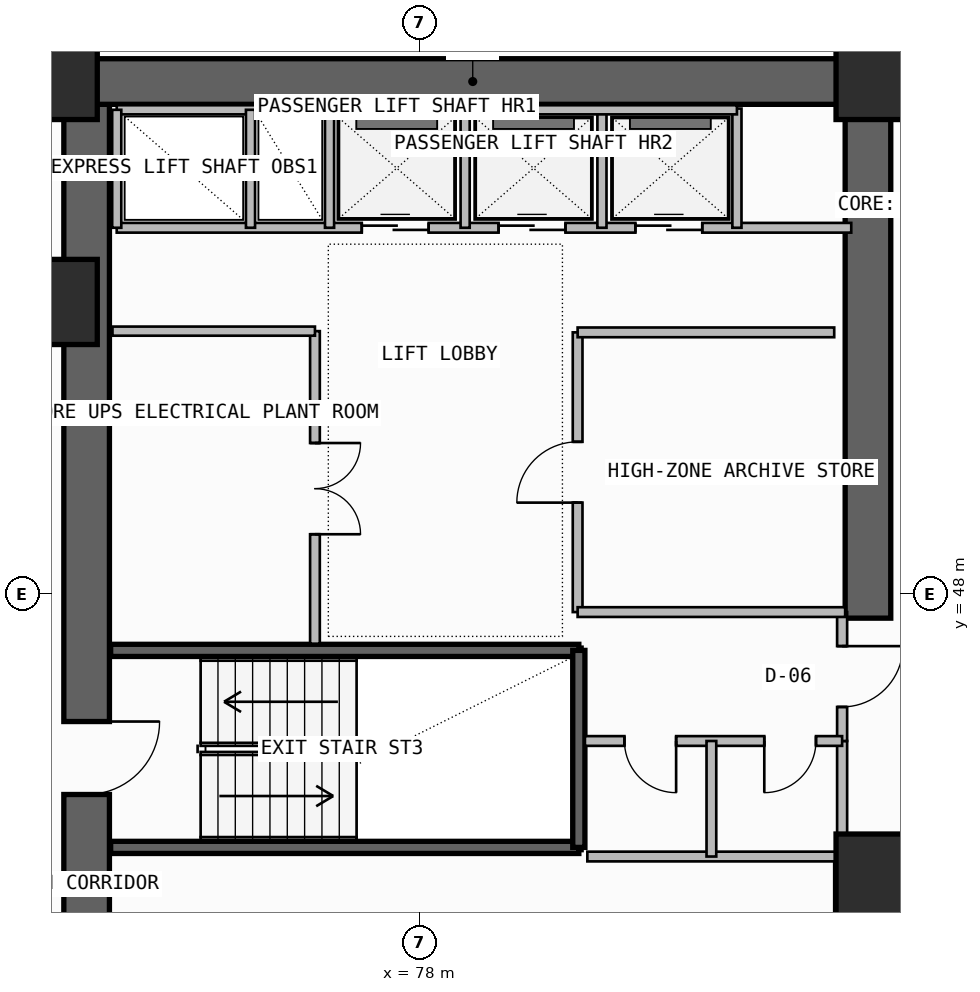
"""IFC4 building model, lengths in metres.
Left out: names, types, materials, properties, quantities, classifications, styles, units other than length and angle.
Written with IfcOpenShell. Run it as: python <this file> out.ifc"""

import sys

from ifc_helpers import new_model, si_unit, direction, frame, frame_2d, origin, origin_2d, place, context, subcontext, project, spatial, rectangle, extrude, element, fill, save


model = new_model("IFC4")
c1 = context("Model", 3, precision=1e-05, world=origin(), true_north=direction((0.0, 1.0)))
c2 = subcontext(c1, "Body", "Model", "MODEL_VIEW")
j1 = project(units=[si_unit("LENGTHUNIT", "METRE"), si_unit("PLANEANGLEUNIT", "RADIAN")], contexts=[c1])
p1 = place(None, origin())
s1 = spatial("IfcSite", under=j1, at=p1, CompositionType="ELEMENT")
p2 = place(p1, origin())
s2 = spatial("IfcBuilding", under=s1, at=p2, CompositionType="ELEMENT")
p3 = place(p2, frame((0.0, 0.0, 229.06)))
s3 = spatial("IfcBuildingStorey", under=s2, at=p3, CompositionType="ELEMENT", Elevation=229.06)
p4 = place(p3, frame((72.525, 35.5, -0.26), z_axis=(0.0, 0.0, 1.0), x_axis=(0.0, 1.0, 0.0)))
e1 = element("IfcWall", 1, at=p4, inside=s3, PredefinedType="SHEAR", context=c2, shape_type="SweptSolid", body=[
    extrude(rectangle(XDim=7.85, YDim=0.75, at=frame_2d((3.925, 0.0))), origin(), (0.0, 0.0, 1.0), 3.52),
])
p5 = place(p4, frame((1.45, 0.0, 0.26)))
e2 = element("IfcOpeningElement", 2, at=p5, cuts=e1, PredefinedType="OPENING", context=c2, shape_type="SweptSolid", body=[
    extrude(rectangle(XDim=1.2, YDim=2.2, at=frame_2d((0.6, 1.1))), frame((0.0, 0.385, 0.0), z_axis=(0.0, -1.0, 0.0), x_axis=(1.0, 0.0, 0.0)), (0.0, 0.0, 1.0), 0.77),
])
p6 = place(p3, frame((72.525, 43.35, -0.26), z_axis=(0.0, 0.0, 1.0), x_axis=(0.0, 1.0, 0.0)))
e3 = element("IfcWall", 3, at=p6, inside=s3, PredefinedType="SHEAR", context=c2, shape_type="SweptSolid", body=[
    extrude(rectangle(XDim=12.7, YDim=0.75, at=frame_2d((6.35, 0.0))), origin(), (0.0, 0.0, 1.0), 3.52),
])
p7 = place(p6, frame((1.35, 0.0, 0.26)))
e4 = element("IfcOpeningElement", 4, at=p7, cuts=e3, PredefinedType="OPENING", context=c2, shape_type="SweptSolid", body=[
    extrude(rectangle(XDim=1.2, YDim=2.2, at=frame_2d((0.6, 1.1))), frame((0.0, 0.385, 0.0), z_axis=(0.0, -1.0, 0.0), x_axis=(1.0, 0.0, 0.0)), (0.0, 0.0, 1.0), 0.77),
])
p8 = place(p3, frame((72.0, 56.425, -0.26), z_axis=(0.0, 0.0, 1.0), x_axis=(1.0, 0.0, 0.0)))
e5 = element("IfcWall", 5, at=p8, inside=s3, PredefinedType="SHEAR", context=c2, shape_type="SweptSolid", body=[
    extrude(rectangle(XDim=13.75, YDim=0.75, at=frame_2d((6.875, 0.0))), origin(), (0.0, 0.0, 1.0), 3.52),
])
p9 = place(p3, frame((85.375, 47.6, -0.26), z_axis=(0.0, 0.0, 1.0), x_axis=(0.0, 1.0, 0.0)))
e6 = element("IfcWall", 6, at=p9, inside=s3, PredefinedType="SHEAR", context=c2, shape_type="SweptSolid", body=[
    extrude(rectangle(XDim=8.45, YDim=0.75, at=frame_2d((4.225, 0.0))), origin(), (0.0, 0.0, 1.0), 3.52),
])
for number, where, z_axis, x_axis in (
    (7, (85.55, 43.35, 0.0), (0.0, 0.0, 1.0), (1.0, 0.0, 0.0)),
    (8, (72.0, 52.8, 0.0), (0.0, 0.0, 1.0), (1.0, 0.0, 0.0)),
    (9, (72.0, 56.5, 0.0), (0.0, 0.0, 1.0), (1.0, 0.0, 0.0)),
    (10, (85.55, 56.5, 0.0), (0.0, 0.0, 1.0), (1.0, 0.0, 0.0)),
):
    element("IfcColumn", number, at=place(p3, frame(where, z_axis=z_axis, x_axis=x_axis)), inside=s3, PredefinedType="COLUMN", context=c2, shape_type="SweptSolid", body=[
        extrude(rectangle(XDim=1.4, YDim=1.4, at=origin_2d()), origin(), (0.0, 0.0, 1.0), 3.52),
    ])
p10 = place(p3, frame((116.396, 56.722, 0.0), z_axis=(0.0, 0.0, 1.0), x_axis=(-0.977936620644, 0.208901809478, 0.0)))
e11 = element("IfcWall", 11, at=p10, inside=s3, PredefinedType="PARAPET", context=c2, shape_type="SweptSolid", body=[
    extrude(rectangle(XDim=31.685, YDim=0.2, at=frame_2d((15.843, 0.0))), origin(), (0.0, 0.0, 1.0), 1.15),
])
p11 = place(p3, frame((84.92, 38.85, 0.0), z_axis=(0.0, 0.0, 1.0), x_axis=(0.0, 1.0, 0.0)))
e12 = element("IfcWall", 12, at=p11, inside=s3, PredefinedType="SOLIDWALL", context=c2, shape_type="SweptSolid", body=[
    extrude(rectangle(XDim=4.83, YDim=0.2, at=frame_2d((2.415, 0.0))), origin(), (0.0, 0.0, 1.0), 3.26),
])
p12 = place(p11, frame((1.25, 0.0, 0.0)))
e13 = element("IfcOpeningElement", 13, at=p12, cuts=e12, PredefinedType="OPENING", context=c2, shape_type="SweptSolid", body=[
    extrude(rectangle(XDim=1.1, YDim=2.2, at=frame_2d((0.55, 1.1))), frame((0.0, 0.11, 0.0), z_axis=(0.0, -1.0, 0.0), x_axis=(1.0, 0.0, 0.0)), (0.0, 0.0, 1.0), 0.22),
])
for number, where, z_axis, x_axis in (
    (14, (72.92, 43.83, -0.26), (0.0, 0.0, 1.0), (1.0, 0.0, 0.0)),
    (15, (72.92, 47.07, -0.26), (0.0, 0.0, 1.0), (1.0, 0.0, 0.0)),
):
    element("IfcWall", number, at=place(p3, frame(where, z_axis=z_axis, x_axis=x_axis)), inside=s3, PredefinedType="SOLIDWALL", context=c2, shape_type="SweptSolid", body=[
        extrude(rectangle(XDim=7.7, YDim=0.2, at=frame_2d((3.85, 0.0))), origin(), (0.0, 0.0, 1.0), 3.52),
    ])
p13 = place(p3, frame((80.62, 43.83, -0.26), z_axis=(0.0, 0.0, 1.0), x_axis=(0.0, 1.0, 0.0)))
e16 = element("IfcWall", 16, at=p13, inside=s3, PredefinedType="SOLIDWALL", context=c2, shape_type="SweptSolid", body=[
    extrude(rectangle(XDim=3.24, YDim=0.2, at=frame_2d((1.62, 0.0))), origin(), (0.0, 0.0, 1.0), 3.52),
])
p14 = place(p3, frame((84.95, 43.68, 0.0), z_axis=(0.0, 0.0, 1.0), x_axis=(0.0, 1.0, 0.0)))
e17 = element("IfcWall", 17, at=p14, inside=s3, PredefinedType="PLUMBINGWALL", context=c2, shape_type="SweptSolid", body=[
    extrude(rectangle(XDim=1.9, YDim=0.165, at=frame_2d((0.95, 0.0))), origin(), (0.0, 0.0, 1.0), 3.26),
])
p15 = place(p3, frame((84.95, 45.58, 0.0), z_axis=(0.0, 0.0, 1.0), x_axis=(0.0, 1.0, 0.0)))
e18 = element("IfcWall", 18, at=p15, inside=s3, PredefinedType="PARTITIONING", context=c2, shape_type="SweptSolid", body=[
    extrude(rectangle(XDim=2.12, YDim=0.165, at=frame_2d((1.06, 0.0))), origin(), (0.0, 0.0, 1.0), 3.26),
])
p16 = place(p15, frame((0.56, 0.0, 0.0)))
e19 = element("IfcOpeningElement", 19, at=p16, cuts=e18, PredefinedType="OPENING", context=c2, shape_type="SweptSolid", body=[
    extrude(rectangle(XDim=1.0, YDim=2.2, at=frame_2d((0.5, 1.1))), frame((0.0, 0.093, 0.0), z_axis=(0.0, -1.0, 0.0), x_axis=(1.0, 0.0, 0.0)), (0.0, 0.0, 1.0), 0.185),
])
p17 = place(p3, frame((80.72, 45.58, 0.0), z_axis=(0.0, 0.0, 1.0), x_axis=(1.0, 0.0, 0.0)))
e20 = element("IfcWall", 20, at=p17, inside=s3, PredefinedType="PLUMBINGWALL", context=c2, shape_type="SweptSolid", body=[
    extrude(rectangle(XDim=4.23, YDim=0.16, at=frame_2d((2.115, 0.0))), origin(), (0.0, 0.0, 1.0), 3.26),
])
p18 = place(p17, frame((0.65, 0.0, 0.0)))
e21 = element("IfcOpeningElement", 21, at=p18, cuts=e20, PredefinedType="OPENING", context=c2, shape_type="SweptSolid", body=[
    extrude(rectangle(XDim=0.85, YDim=2.05, at=frame_2d((0.425, 1.025))), frame((0.0, 0.09, 0.0), z_axis=(0.0, -1.0, 0.0), x_axis=(1.0, 0.0, 0.0)), (0.0, 0.0, 1.0), 0.18),
])
p19 = place(p17, frame((2.95, 0.0, 0.0)))
e22 = element("IfcOpeningElement", 22, at=p19, cuts=e20, PredefinedType="OPENING", context=c2, shape_type="SweptSolid", body=[
    extrude(rectangle(XDim=0.85, YDim=2.05, at=frame_2d((0.425, 1.025))), frame((0.0, 0.09, 0.0), z_axis=(0.0, -1.0, 0.0), x_axis=(1.0, 0.0, 0.0)), (0.0, 0.0, 1.0), 0.18),
])
p20 = place(p3, frame((80.76, 43.68, 0.0), z_axis=(0.0, 0.0, 1.0), x_axis=(1.0, 0.0, 0.0)))
e23 = element("IfcWall", 23, at=p20, inside=s3, PredefinedType="PLUMBINGWALL", context=c2, shape_type="SweptSolid", body=[
    extrude(rectangle(XDim=4.19, YDim=0.16, at=frame_2d((2.095, 0.0))), origin(), (0.0, 0.0, 1.0), 3.26),
])
p21 = place(p3, frame((82.8, 43.68, 0.0), z_axis=(0.0, 0.0, 1.0), x_axis=(0.0, 1.0, 0.0)))
e24 = element("IfcWall", 24, at=p21, inside=s3, PredefinedType="PLUMBINGWALL", context=c2, shape_type="SweptSolid", body=[
    extrude(rectangle(XDim=1.9, YDim=0.16, at=frame_2d((0.95, 0.0))), origin(), (0.0, 0.0, 1.0), 3.26),
])
p22 = place(p3, frame((76.28, 47.18, 0.0), z_axis=(0.0, 0.0, 1.0), x_axis=(0.0, 1.0, 0.0)))
e25 = element("IfcWall", 25, at=p22, inside=s3, PredefinedType="SOLIDWALL", context=c2, shape_type="SweptSolid", body=[
    extrude(rectangle(XDim=5.14, YDim=0.16, at=frame_2d((2.57, 0.0))), origin(), (0.0, 0.0, 1.0), 3.26),
])
p23 = place(p22, frame((1.8, 0.0, 0.0)))
e26 = element("IfcOpeningElement", 26, at=p23, cuts=e25, PredefinedType="OPENING", context=c2, shape_type="SweptSolid", body=[
    extrude(rectangle(XDim=1.5, YDim=2.25, at=frame_2d((0.75, 1.125))), frame((0.0, 0.09, 0.0), z_axis=(0.0, -1.0, 0.0), x_axis=(1.0, 0.0, 0.0)), (0.0, 0.0, 1.0), 0.18),
])
p24 = place(p3, frame((72.95, 52.32, 0.0), z_axis=(0.0, 0.0, 1.0), x_axis=(1.0, 0.0, 0.0)))
e27 = element("IfcWall", 27, at=p24, inside=s3, PredefinedType="SOLIDWALL", context=c2, shape_type="SweptSolid", body=[
    extrude(rectangle(XDim=3.33, YDim=0.15, at=frame_2d((1.665, 0.0))), origin(), (0.0, 0.0, 1.0), 3.26),
])
p25 = place(p3, frame((80.6, 47.7, 0.0), z_axis=(0.0, 0.0, 1.0), x_axis=(0.0, 1.0, 0.0)))
e28 = element("IfcWall", 28, at=p25, inside=s3, PredefinedType="SOLIDWALL", context=c2, shape_type="SweptSolid", body=[
    extrude(rectangle(XDim=4.6, YDim=0.16, at=frame_2d((2.3, 0.0))), origin(), (0.0, 0.0, 1.0), 3.26),
])
p26 = place(p25, frame((1.8, 0.0, 0.0)))
e29 = element("IfcOpeningElement", 29, at=p26, cuts=e28, PredefinedType="OPENING", context=c2, shape_type="SweptSolid", body=[
    extrude(rectangle(XDim=1.0, YDim=2.2, at=frame_2d((0.5, 1.1))), frame((0.0, 0.09, 0.0), z_axis=(0.0, -1.0, 0.0), x_axis=(1.0, 0.0, 0.0)), (0.0, 0.0, 1.0), 0.18),
])
p27 = place(p3, frame((80.6, 47.7, 0.0), z_axis=(0.0, 0.0, 1.0), x_axis=(1.0, 0.0, 0.0)))
e30 = element("IfcWall", 30, at=p27, inside=s3, PredefinedType="SOLIDWALL", context=c2, shape_type="SweptSolid", body=[
    extrude(rectangle(XDim=4.4, YDim=0.16, at=frame_2d((2.2, 0.0))), origin(), (0.0, 0.0, 1.0), 3.26),
])
p28 = place(p3, frame((80.6, 52.3, 0.0), z_axis=(0.0, 0.0, 1.0), x_axis=(1.0, 0.0, 0.0)))
e31 = element("IfcWall", 31, at=p28, inside=s3, PredefinedType="SOLIDWALL", context=c2, shape_type="SweptSolid", body=[
    extrude(rectangle(XDim=4.22, YDim=0.16, at=frame_2d((2.11, 0.0))), origin(), (0.0, 0.0, 1.0), 3.26),
])
p29 = place(p3, frame((73.02, 54.02, 0.0), z_axis=(0.0, 0.0, 1.0), x_axis=(1.0, 0.0, 0.0)))
e32 = element("IfcWall", 32, at=p29, inside=s3, PredefinedType="SOLIDWALL", context=c2, shape_type="SweptSolid", body=[
    extrude(rectangle(XDim=12.08, YDim=0.16, at=frame_2d((6.04, 0.0))), origin(), (0.0, 0.0, 1.0), 3.26),
])
p30 = place(p29, frame((4.03, 0.0, 0.0)))
e33 = element("IfcOpeningElement", 33, at=p30, cuts=e32, PredefinedType="OPENING", context=c2, shape_type="SweptSolid", body=[
    extrude(rectangle(XDim=1.1, YDim=2.25, at=frame_2d((0.55, 1.125))), frame((0.0, 0.09, 0.0), z_axis=(0.0, -1.0, 0.0), x_axis=(1.0, 0.0, 0.0)), (0.0, 0.0, 1.0), 0.18),
])
p31 = place(p29, frame((6.28, 0.0, 0.0)))
e34 = element("IfcOpeningElement", 34, at=p31, cuts=e32, PredefinedType="OPENING", context=c2, shape_type="SweptSolid", body=[
    extrude(rectangle(XDim=1.1, YDim=2.25, at=frame_2d((0.55, 1.125))), frame((0.0, 0.09, 0.0), z_axis=(0.0, -1.0, 0.0), x_axis=(1.0, 0.0, 0.0)), (0.0, 0.0, 1.0), 0.18),
])
p32 = place(p29, frame((8.53, 0.0, 0.0)))
e35 = element("IfcOpeningElement", 35, at=p32, cuts=e32, PredefinedType="OPENING", context=c2, shape_type="SweptSolid", body=[
    extrude(rectangle(XDim=1.1, YDim=2.25, at=frame_2d((0.55, 1.125))), frame((0.0, 0.09, 0.0), z_axis=(0.0, -1.0, 0.0), x_axis=(1.0, 0.0, 0.0)), (0.0, 0.0, 1.0), 0.18),
])
p33 = place(p3, frame((73.02, 55.96, 0.0), z_axis=(0.0, 0.0, 1.0), x_axis=(1.0, 0.0, 0.0)))
e36 = element("IfcWall", 36, at=p33, inside=s3, PredefinedType="SOLIDWALL", context=c2, shape_type="SweptSolid", body=[
    extrude(rectangle(XDim=3.5, YDim=0.15, at=frame_2d((1.75, 0.0))), origin(), (0.0, 0.0, 1.0), 3.26),
])
p34 = place(p3, frame((73.02, 54.02, 0.0), z_axis=(0.0, 0.0, 1.0), x_axis=(0.0, 1.0, 0.0)))
e37 = element("IfcWall", 37, at=p34, inside=s3, PredefinedType="PLUMBINGWALL", context=c2, shape_type="SweptSolid", body=[
    extrude(rectangle(XDim=1.94, YDim=0.15, at=frame_2d((0.97, 0.0))), origin(), (0.0, 0.0, 1.0), 3.26),
])
p35 = place(p3, frame((76.52, 54.02, 0.0), z_axis=(0.0, 0.0, 1.0), x_axis=(0.0, 1.0, 0.0)))
e38 = element("IfcWall", 38, at=p35, inside=s3, PredefinedType="SOLIDWALL", context=c2, shape_type="SweptSolid", body=[
    extrude(rectangle(XDim=1.94, YDim=0.15, at=frame_2d((0.97, 0.0))), origin(), (0.0, 0.0, 1.0), 3.26),
])
p36 = place(p3, frame((75.22, 54.02, 0.0), z_axis=(0.0, 0.0, 1.0), x_axis=(0.0, 1.0, 0.0)))
e39 = element("IfcWall", 39, at=p36, inside=s3, PredefinedType="PLUMBINGWALL", context=c2, shape_type="SweptSolid", body=[
    extrude(rectangle(XDim=1.94, YDim=0.15, at=frame_2d((0.97, 0.0))), origin(), (0.0, 0.0, 1.0), 3.26),
])
for number, where, z_axis, x_axis in (
    (40, (78.75, 54.02, 0.0), (0.0, 0.0, 1.0), (0.0, 1.0, 0.0)),
    (41, (81.0, 54.02, 0.0), (0.0, 0.0, 1.0), (0.0, 1.0, 0.0)),
):
    element("IfcWall", number, at=place(p3, frame(where, z_axis=z_axis, x_axis=x_axis)), inside=s3, PredefinedType="PLUMBINGWALL", context=c2, shape_type="SweptSolid", body=[
        extrude(rectangle(XDim=1.96, YDim=0.15, at=frame_2d((0.98, 0.0))), origin(), (0.0, 0.0, 1.0), 3.26),
    ])
p37 = place(p3, frame((83.22, 54.02, 0.0), z_axis=(0.0, 0.0, 1.0), x_axis=(0.0, 1.0, 0.0)))
e42 = element("IfcWall", 42, at=p37, inside=s3, PredefinedType="SOLIDWALL", context=c2, shape_type="SweptSolid", body=[
    extrude(rectangle(XDim=1.96, YDim=0.15, at=frame_2d((0.98, 0.0))), origin(), (0.0, 0.0, 1.0), 3.26),
])
p38 = place(p3, frame((76.52, 55.96, 0.0), z_axis=(0.0, 0.0, 1.0), x_axis=(1.0, 0.0, 0.0)))
e43 = element("IfcWall", 43, at=p38, inside=s3, PredefinedType="SOLIDWALL", context=c2, shape_type="SweptSolid", body=[
    extrude(rectangle(XDim=6.7, YDim=0.15, at=frame_2d((3.35, 0.0))), origin(), (0.0, 0.0, 1.0), 3.26),
])
p39 = place(p7, frame((1.2, 0.0, 0.0), z_axis=(0.0, 0.0, 1.0), x_axis=(-1.0, 0.0, 0.0)))
e44 = element("IfcDoor", 44, at=p39, inside=s3, OperationType="SINGLE_SWING_LEFT", PredefinedType="USERDEFINED", context=c2, shape_type="SweptSolid", body=[
    extrude(rectangle(XDim=1.2, YDim=2.2, at=frame_2d((0.6, 1.1))), frame((0.0, 0.025, 0.0), z_axis=(0.0, -1.0, 0.0), x_axis=(1.0, 0.0, 0.0)), (0.0, 0.0, 1.0), 0.05),
])
fill(e4, e44)
p40 = place(p16, frame((1.0, 0.0, 0.0), z_axis=(0.0, 0.0, 1.0), x_axis=(-1.0, 0.0, 0.0)))
e45 = element("IfcDoor", 45, at=p40, inside=s3, OperationType="SINGLE_SWING_LEFT", PredefinedType="DOOR", context=c2, shape_type="SweptSolid", body=[
    extrude(rectangle(XDim=1.0, YDim=2.2, at=frame_2d((0.5, 1.1))), frame((0.0, 0.025, 0.0), z_axis=(0.0, -1.0, 0.0), x_axis=(1.0, 0.0, 0.0)), (0.0, 0.0, 1.0), 0.05),
])
fill(e19, e45)
p41 = place(p18, frame((0.85, 0.0, 0.0), z_axis=(0.0, 0.0, 1.0), x_axis=(-1.0, 0.0, 0.0)))
e46 = element("IfcDoor", 46, at=p41, inside=s3, OperationType="SINGLE_SWING_LEFT", PredefinedType="DOOR", context=c2, shape_type="SweptSolid", body=[
    extrude(rectangle(XDim=0.85, YDim=2.05, at=frame_2d((0.425, 1.025))), frame((0.0, 0.025, 0.0), z_axis=(0.0, -1.0, 0.0), x_axis=(1.0, 0.0, 0.0)), (0.0, 0.0, 1.0), 0.05),
])
fill(e21, e46)
p42 = place(p19, frame((0.85, 0.0, 0.0), z_axis=(0.0, 0.0, 1.0), x_axis=(-1.0, 0.0, 0.0)))
e47 = element("IfcDoor", 47, at=p42, inside=s3, OperationType="SINGLE_SWING_RIGHT", PredefinedType="DOOR", context=c2, shape_type="SweptSolid", body=[
    extrude(rectangle(XDim=0.85, YDim=2.05, at=frame_2d((0.425, 1.025))), frame((0.0, 0.025, 0.0), z_axis=(0.0, -1.0, 0.0), x_axis=(1.0, 0.0, 0.0)), (0.0, 0.0, 1.0), 0.05),
])
fill(e22, e47)
p43 = place(p23, frame((1.5, 0.0, 0.0), z_axis=(0.0, 0.0, 1.0), x_axis=(-1.0, 0.0, 0.0)))
e48 = element("IfcDoor", 48, at=p43, inside=s3, OperationType="DOUBLE_DOOR_SINGLE_SWING", PredefinedType="DOOR", context=c2, shape_type="SweptSolid", body=[
    extrude(rectangle(XDim=1.5, YDim=2.25, at=frame_2d((0.75, 1.125))), frame((0.0, 0.025, 0.0), z_axis=(0.0, -1.0, 0.0), x_axis=(1.0, 0.0, 0.0)), (0.0, 0.0, 1.0), 0.05),
])
fill(e26, e48)
p44 = place(p26, origin())
e49 = element("IfcDoor", 49, at=p44, inside=s3, OperationType="SINGLE_SWING_LEFT", PredefinedType="DOOR", context=c2, shape_type="SweptSolid", body=[
    extrude(rectangle(XDim=1.0, YDim=2.2, at=frame_2d((0.5, 1.1))), frame((0.0, 0.025, 0.0), z_axis=(0.0, -1.0, 0.0), x_axis=(1.0, 0.0, 0.0)), (0.0, 0.0, 1.0), 0.05),
])
fill(e29, e49)
p45 = place(p30, origin())
e50 = element("IfcDoor", 50, at=p45, inside=s3, OperationType="DOUBLE_DOOR_SLIDING", PredefinedType="DOOR", context=c2, shape_type="SweptSolid", body=[
    extrude(rectangle(XDim=1.1, YDim=2.25, at=frame_2d((0.55, 1.125))), frame((0.0, 0.025, 0.0), z_axis=(0.0, -1.0, 0.0), x_axis=(1.0, 0.0, 0.0)), (0.0, 0.0, 1.0), 0.05),
])
fill(e33, e50)
p46 = place(p31, origin())
e51 = element("IfcDoor", 51, at=p46, inside=s3, OperationType="DOUBLE_DOOR_SLIDING", PredefinedType="DOOR", context=c2, shape_type="SweptSolid", body=[
    extrude(rectangle(XDim=1.1, YDim=2.25, at=frame_2d((0.55, 1.125))), frame((0.0, 0.025, 0.0), z_axis=(0.0, -1.0, 0.0), x_axis=(1.0, 0.0, 0.0)), (0.0, 0.0, 1.0), 0.05),
])
fill(e34, e51)
p47 = place(p32, origin())
e52 = element("IfcDoor", 52, at=p47, inside=s3, OperationType="DOUBLE_DOOR_SLIDING", PredefinedType="DOOR", context=c2, shape_type="SweptSolid", body=[
    extrude(rectangle(XDim=1.1, YDim=2.25, at=frame_2d((0.55, 1.125))), frame((0.0, 0.025, 0.0), z_axis=(0.0, -1.0, 0.0), x_axis=(1.0, 0.0, 0.0)), (0.0, 0.0, 1.0), 0.05),
])
fill(e35, e52)
save(model, sys.argv[1])
